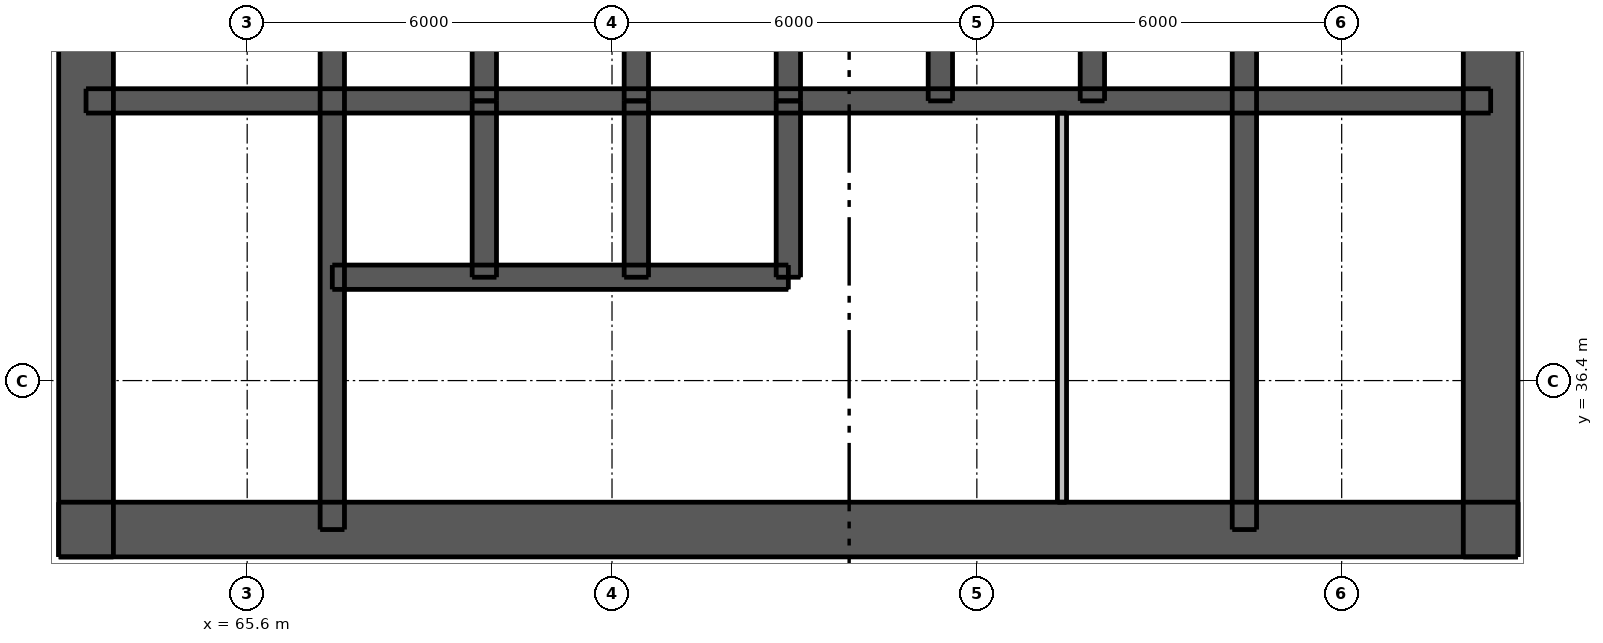
"""IFC4 building model, lengths in metres.
Left out: names, types, materials, properties, quantities, classifications, styles, units other than length and angle.
Written with IfcOpenShell. Run it as: python <this file> out.ifc"""

import sys

from ifc_helpers import new_model, si_unit, direction, frame, frame_2d, origin, place, context, subcontext, project, spatial, rectangle, extrude, element, fill, save


model = new_model("IFC4")
c1 = context("Model", 3, precision=1e-05, world=origin(), true_north=direction((0.0, 1.0)))
c2 = subcontext(c1, "Body", "Model", "MODEL_VIEW")
j1 = project(units=[si_unit("LENGTHUNIT", "METRE"), si_unit("PLANEANGLEUNIT", "RADIAN")], contexts=[c1])
p1 = place(None, origin())
s1 = spatial("IfcSite", under=j1, at=p1, CompositionType="ELEMENT")
p2 = place(p1, origin())
s2 = spatial("IfcBuilding", under=s1, at=p2, CompositionType="ELEMENT")
p3 = place(p2, frame((0.0, 0.0, 14.5)))
s3 = spatial("IfcBuildingStorey", under=s2, at=p3, CompositionType="ELEMENT", Elevation=14.5)
p4 = place(p3, frame((62.5, 33.95, 0.0), z_axis=(0.0, 0.0, 1.0), x_axis=(1.0, 0.0, 0.0)))
e1 = element("IfcWall", 1, at=p4, inside=s3, PredefinedType="SHEAR", context=c2, shape_type="SweptSolid", body=[
    extrude(rectangle(XDim=24.0, YDim=0.9, at=frame_2d((12.0, 0.0))), origin(), (0.0, 0.0, 1.0), 4.2),
])
p5 = place(p4, frame((2.05, 0.0, 0.0)))
e2 = element("IfcOpeningElement", 2, at=p5, cuts=e1, PredefinedType="OPENING", context=c2, shape_type="SweptSolid", body=[
    extrude(rectangle(XDim=1.1, YDim=2.1, at=frame_2d((0.55, 1.05))), frame((0.0, 0.46, 0.0), z_axis=(0.0, -1.0, 0.0), x_axis=(1.0, 0.0, 0.0)), (0.0, 0.0, 1.0), 0.92),
])
p6 = place(p4, frame((20.85, 0.0, 0.0)))
e3 = element("IfcOpeningElement", 3, at=p6, cuts=e1, PredefinedType="OPENING", context=c2, shape_type="SweptSolid", body=[
    extrude(rectangle(XDim=1.1, YDim=2.1, at=frame_2d((0.55, 1.05))), frame((0.0, 0.46, 0.0), z_axis=(0.0, -1.0, 0.0), x_axis=(1.0, 0.0, 0.0)), (0.0, 0.0, 1.0), 0.92),
])
p7 = place(p4, frame((8.0, 0.0, 0.0)))
e4 = element("IfcOpeningElement", 4, at=p7, cuts=e1, PredefinedType="OPENING", context=c2, shape_type="SweptSolid", body=[
    extrude(rectangle(XDim=1.1, YDim=2.1, at=frame_2d((0.55, 1.05))), frame((0.0, 0.46, 0.0), z_axis=(0.0, -1.0, 0.0), x_axis=(1.0, 0.0, 0.0)), (0.0, 0.0, 1.0), 0.92),
])
p8 = place(p4, frame((17.488, 0.0, 0.0)))
e5 = element("IfcOpeningElement", 5, at=p8, cuts=e1, PredefinedType="OPENING", context=c2, shape_type="SweptSolid", body=[
    extrude(rectangle(XDim=0.9, YDim=2.1, at=frame_2d((0.45, 1.05))), frame((0.0, 0.46, 0.0), z_axis=(0.0, -1.0, 0.0), x_axis=(1.0, 0.0, 0.0)), (0.0, 0.0, 1.0), 0.92),
])
p9 = place(p3, frame((62.95, 33.5, 0.0), z_axis=(0.0, 0.0, 1.0), x_axis=(0.0, 1.0, 0.0)))
e6 = element("IfcWall", 6, at=p9, inside=s3, PredefinedType="SHEAR", context=c2, shape_type="SweptSolid", body=[
    extrude(rectangle(XDim=24.0, YDim=0.9, at=frame_2d((12.0, 0.0))), origin(), (0.0, 0.0, 1.0), 4.2),
])
p10 = place(p9, frame((11.2, 0.0, 0.0)))
e7 = element("IfcOpeningElement", 7, at=p10, cuts=e6, PredefinedType="OPENING", context=c2, shape_type="SweptSolid", body=[
    extrude(rectangle(XDim=1.6, YDim=2.1, at=frame_2d((0.8, 1.05))), frame((0.0, 0.46, 0.0), z_axis=(0.0, -1.0, 0.0), x_axis=(1.0, 0.0, 0.0)), (0.0, 0.0, 1.0), 0.92),
])
p11 = place(p3, frame((86.05, 33.5, 0.0), z_axis=(0.0, 0.0, 1.0), x_axis=(0.0, 1.0, 0.0)))
e8 = element("IfcWall", 8, at=p11, inside=s3, PredefinedType="SHEAR", context=c2, shape_type="SweptSolid", body=[
    extrude(rectangle(XDim=24.0, YDim=0.9, at=frame_2d((12.0, 0.0))), origin(), (0.0, 0.0, 1.0), 4.2),
])
p12 = place(p11, frame((11.2, 0.0, 0.0)))
e9 = element("IfcOpeningElement", 9, at=p12, cuts=e8, PredefinedType="OPENING", context=c2, shape_type="SweptSolid", body=[
    extrude(rectangle(XDim=1.6, YDim=2.1, at=frame_2d((0.8, 1.05))), frame((0.0, 0.46, 0.0), z_axis=(0.0, -1.0, 0.0), x_axis=(1.0, 0.0, 0.0)), (0.0, 0.0, 1.0), 0.92),
])
p13 = place(p3, frame((62.95, 41.0, 0.0), z_axis=(0.0, 0.0, 1.0), x_axis=(1.0, 0.0, 0.0)))
e10 = element("IfcWall", 10, at=p13, inside=s3, PredefinedType="SHEAR", context=c2, shape_type="SweptSolid", body=[
    extrude(rectangle(XDim=23.1, YDim=0.4, at=frame_2d((11.55, 0.0))), origin(), (0.0, 0.0, 1.0), 4.2),
])
p14 = place(p3, frame((67.0, 33.95, 0.0), z_axis=(0.0, 0.0, 1.0), x_axis=(0.0, 1.0, 0.0)))
e11 = element("IfcWall", 11, at=p14, inside=s3, PredefinedType="SHEAR", context=c2, shape_type="SweptSolid", body=[
    extrude(rectangle(XDim=9.95, YDim=0.4, at=frame_2d((4.975, 0.0))), origin(), (0.0, 0.0, 1.0), 4.2),
])
p15 = place(p14, frame((0.65, 0.0, 0.0)))
e12 = element("IfcOpeningElement", 12, at=p15, cuts=e11, PredefinedType="OPENING", context=c2, shape_type="SweptSolid", body=[
    extrude(rectangle(XDim=1.1, YDim=2.1, at=frame_2d((0.55, 1.05))), frame((0.0, 0.21, 0.0), z_axis=(0.0, -1.0, 0.0), x_axis=(1.0, 0.0, 0.0)), (0.0, 0.0, 1.0), 0.42),
])
p16 = place(p3, frame((82.0, 33.95, 0.0), z_axis=(0.0, 0.0, 1.0), x_axis=(0.0, 1.0, 0.0)))
e13 = element("IfcWall", 13, at=p16, inside=s3, PredefinedType="SHEAR", context=c2, shape_type="SweptSolid", body=[
    extrude(rectangle(XDim=9.95, YDim=0.4, at=frame_2d((4.975, 0.0))), origin(), (0.0, 0.0, 1.0), 4.2),
])
for number, where, z_axis, x_axis in (
    (14, (69.5, 41.0, 0.0), (0.0, 0.0, 1.0), (0.0, 1.0, 0.0)),
    (15, (72.0, 41.0, 0.0), (0.0, 0.0, 1.0), (0.0, 1.0, 0.0)),
    (16, (74.5, 41.0, 0.0), (0.0, 0.0, 1.0), (0.0, 1.0, 0.0)),
    (17, (77.0, 41.0, 0.0), (0.0, 0.0, 1.0), (0.0, 1.0, 0.0)),
    (18, (79.5, 41.0, 0.0), (0.0, 0.0, 1.0), (0.0, 1.0, 0.0)),
):
    element("IfcWall", number, at=place(p3, frame(where, z_axis=z_axis, x_axis=x_axis)), inside=s3, PredefinedType="SHEAR", context=c2, shape_type="SweptSolid", body=[
        extrude(rectangle(XDim=2.9, YDim=0.4, at=frame_2d((1.45, 0.0))), origin(), (0.0, 0.0, 1.0), 4.2),
    ])
p17 = place(p3, frame((67.0, 38.1, 0.0), z_axis=(0.0, 0.0, 1.0), x_axis=(1.0, 0.0, 0.0)))
e19 = element("IfcWall", 19, at=p17, inside=s3, PredefinedType="SHEAR", context=c2, shape_type="SweptSolid", body=[
    extrude(rectangle(XDim=7.5, YDim=0.4, at=frame_2d((3.75, 0.0))), origin(), (0.0, 0.0, 1.0), 4.2),
])
p18 = place(p17, frame((0.7, 0.0, 0.0)))
e20 = element("IfcOpeningElement", 20, at=p18, cuts=e19, PredefinedType="OPENING", context=c2, shape_type="SweptSolid", body=[
    extrude(rectangle(XDim=1.1, YDim=2.1, at=frame_2d((0.55, 1.05))), frame((0.0, 0.21, 0.0), z_axis=(0.0, -1.0, 0.0), x_axis=(1.0, 0.0, 0.0)), (0.0, 0.0, 1.0), 0.42),
])
p19 = place(p17, frame((3.2, 0.0, 0.0)))
e21 = element("IfcOpeningElement", 21, at=p19, cuts=e19, PredefinedType="OPENING", context=c2, shape_type="SweptSolid", body=[
    extrude(rectangle(XDim=1.1, YDim=2.1, at=frame_2d((0.55, 1.05))), frame((0.0, 0.21, 0.0), z_axis=(0.0, -1.0, 0.0), x_axis=(1.0, 0.0, 0.0)), (0.0, 0.0, 1.0), 0.42),
])
p20 = place(p17, frame((5.65, 0.0, 0.0)))
e22 = element("IfcOpeningElement", 22, at=p20, cuts=e19, PredefinedType="OPENING", context=c2, shape_type="SweptSolid", body=[
    extrude(rectangle(XDim=1.2, YDim=2.1, at=frame_2d((0.6, 1.05))), frame((0.0, 0.21, 0.0), z_axis=(0.0, -1.0, 0.0), x_axis=(1.0, 0.0, 0.0)), (0.0, 0.0, 1.0), 0.42),
])
for number, where, z_axis, x_axis in (
    (23, (69.5, 38.1, 0.0), (0.0, 0.0, 1.0), (0.0, 1.0, 0.0)),
    (24, (72.0, 38.1, 0.0), (0.0, 0.0, 1.0), (0.0, 1.0, 0.0)),
    (25, (74.5, 38.1, 0.0), (0.0, 0.0, 1.0), (0.0, 1.0, 0.0)),
):
    element("IfcWall", number, at=place(p3, frame(where, z_axis=z_axis, x_axis=x_axis)), inside=s3, PredefinedType="SHEAR", context=c2, shape_type="SweptSolid", body=[
        extrude(rectangle(XDim=2.9, YDim=0.4, at=frame_2d((1.45, 0.0))), origin(), (0.0, 0.0, 1.0), 4.2),
    ])
p21 = place(p3, frame((79.0, 34.4, 0.0), z_axis=(0.0, 0.0, 1.0), x_axis=(0.0, 1.0, 0.0)))
e26 = element("IfcWall", 26, at=p21, inside=s3, PredefinedType="PLUMBINGWALL", context=c2, shape_type="SweptSolid", body=[
    extrude(rectangle(XDim=6.4, YDim=0.15, at=frame_2d((3.2, 0.0))), origin(), (0.0, 0.0, 1.0), 4.2),
])
p22 = place(p5, origin())
e27 = element("IfcDoor", 27, at=p22, inside=s3, OperationType="SINGLE_SWING_LEFT", PredefinedType="DOOR", context=c2, shape_type="SweptSolid", body=[
    extrude(rectangle(XDim=1.1, YDim=2.1, at=frame_2d((0.55, 1.05))), frame((0.0, 0.438, 0.0), z_axis=(0.0, -1.0, 0.0), x_axis=(1.0, 0.0, 0.0)), (0.0, 0.0, 1.0), 0.05),
])
fill(e2, e27)
p23 = place(p6, origin())
e28 = element("IfcDoor", 28, at=p23, inside=s3, OperationType="SINGLE_SWING_RIGHT", PredefinedType="DOOR", context=c2, shape_type="SweptSolid", body=[
    extrude(rectangle(XDim=1.1, YDim=2.1, at=frame_2d((0.55, 1.05))), frame((0.0, 0.438, 0.0), z_axis=(0.0, -1.0, 0.0), x_axis=(1.0, 0.0, 0.0)), (0.0, 0.0, 1.0), 0.05),
])
fill(e3, e28)
p24 = place(p7, origin())
e29 = element("IfcDoor", 29, at=p24, inside=s3, OperationType="SINGLE_SWING_LEFT", PredefinedType="DOOR", context=c2, shape_type="SweptSolid", body=[
    extrude(rectangle(XDim=1.1, YDim=2.1, at=frame_2d((0.55, 1.05))), frame((0.0, 0.438, 0.0), z_axis=(0.0, -1.0, 0.0), x_axis=(1.0, 0.0, 0.0)), (0.0, 0.0, 1.0), 0.05),
])
fill(e4, e29)
p25 = place(p15, origin())
e30 = element("IfcDoor", 30, at=p25, inside=s3, OperationType="SINGLE_SWING_RIGHT", PredefinedType="DOOR", context=c2, shape_type="SweptSolid", body=[
    extrude(rectangle(XDim=1.1, YDim=2.1, at=frame_2d((0.55, 1.05))), frame((0.0, -0.138, 0.0), z_axis=(0.0, -1.0, 0.0), x_axis=(1.0, 0.0, 0.0)), (0.0, 0.0, 1.0), 0.05),
])
fill(e12, e30)
p26 = place(p8, origin())
e31 = element("IfcDoor", 31, at=p26, inside=s3, OperationType="SINGLE_SWING_LEFT", PredefinedType="DOOR", context=c2, shape_type="SweptSolid", body=[
    extrude(rectangle(XDim=0.9, YDim=2.1, at=frame_2d((0.45, 1.05))), frame((0.0, 0.438, 0.0), z_axis=(0.0, -1.0, 0.0), x_axis=(1.0, 0.0, 0.0)), (0.0, 0.0, 1.0), 0.05),
])
fill(e5, e31)
p27 = place(p18, origin())
e32 = element("IfcDoor", 32, at=p27, inside=s3, OperationType="DOUBLE_DOOR_SLIDING", PredefinedType="DOOR", context=c2, shape_type="SweptSolid", body=[
    extrude(rectangle(XDim=1.1, YDim=2.1, at=frame_2d((0.55, 1.05))), frame((0.0, 0.025, 0.0), z_axis=(0.0, -1.0, 0.0), x_axis=(1.0, 0.0, 0.0)), (0.0, 0.0, 1.0), 0.05),
])
fill(e20, e32)
p28 = place(p19, origin())
e33 = element("IfcDoor", 33, at=p28, inside=s3, OperationType="DOUBLE_DOOR_SLIDING", PredefinedType="DOOR", context=c2, shape_type="SweptSolid", body=[
    extrude(rectangle(XDim=1.1, YDim=2.1, at=frame_2d((0.55, 1.05))), frame((0.0, 0.025, 0.0), z_axis=(0.0, -1.0, 0.0), x_axis=(1.0, 0.0, 0.0)), (0.0, 0.0, 1.0), 0.05),
])
fill(e21, e33)
p29 = place(p20, origin())
e34 = element("IfcDoor", 34, at=p29, inside=s3, OperationType="DOUBLE_DOOR_SLIDING", PredefinedType="DOOR", context=c2, shape_type="SweptSolid", body=[
    extrude(rectangle(XDim=1.2, YDim=2.1, at=frame_2d((0.6, 1.05))), frame((0.0, 0.025, 0.0), z_axis=(0.0, -1.0, 0.0), x_axis=(1.0, 0.0, 0.0)), (0.0, 0.0, 1.0), 0.05),
])
fill(e22, e34)
save(model, sys.argv[1])
